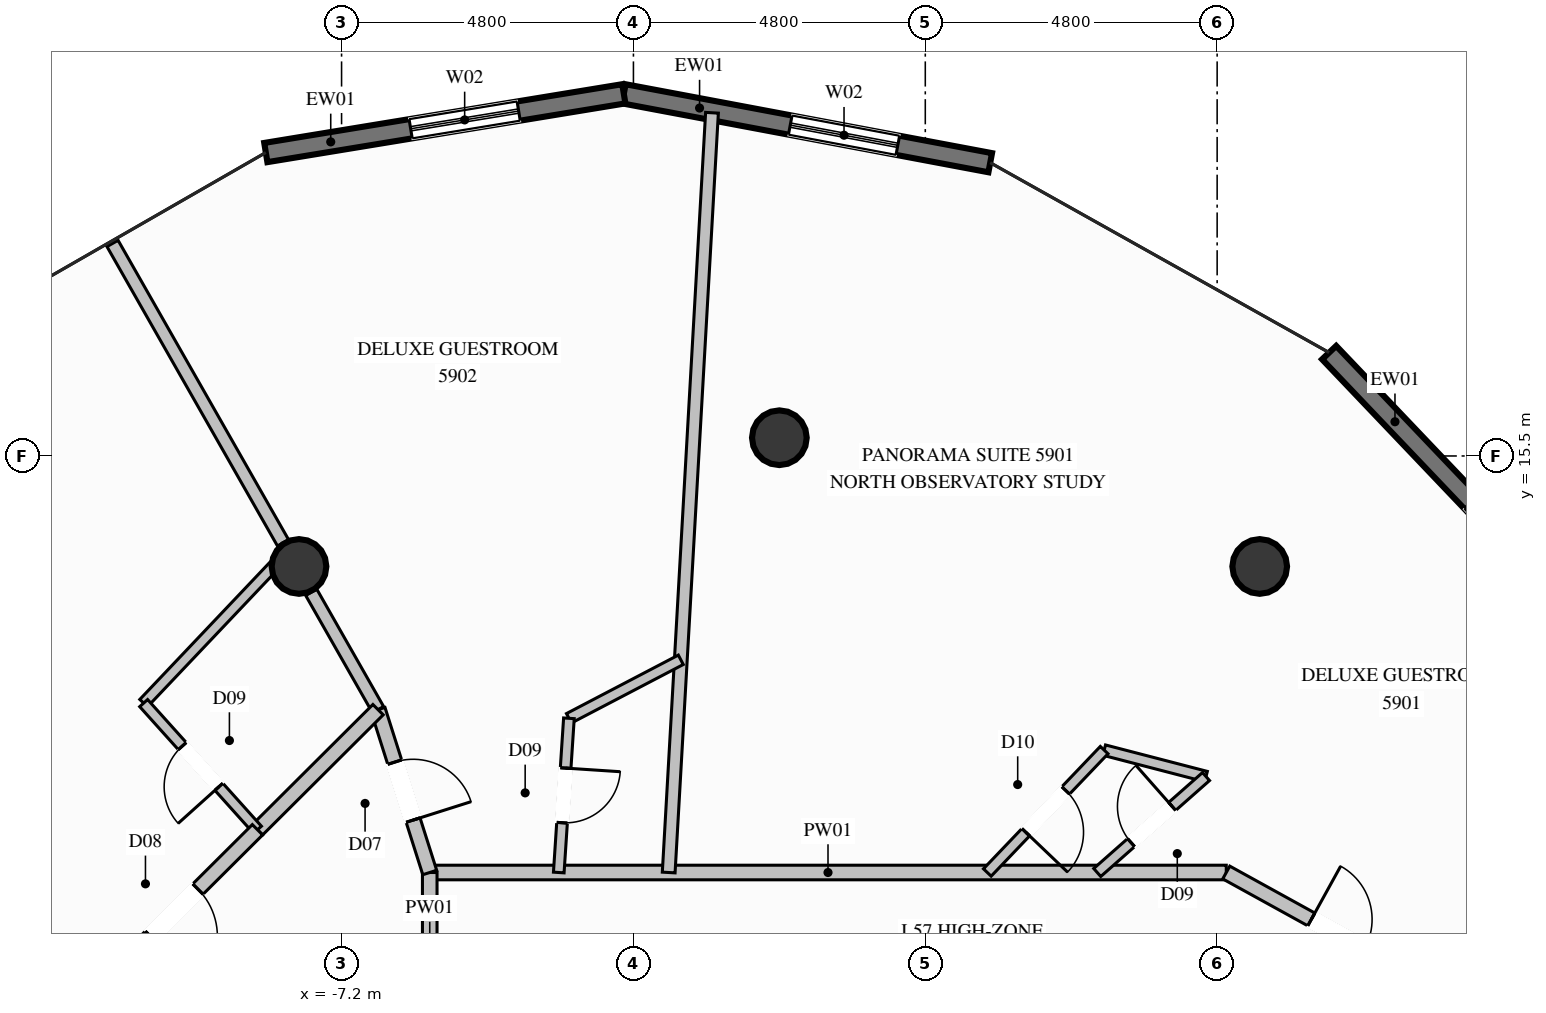
"""IFC4 building model, lengths in metres.
Left out: names, types, materials, properties, quantities, classifications, styles, units other than length and angle.
Written with IfcOpenShell. Run it as: python <this file> out.ifc"""

import sys

from ifc_helpers import new_model, si_unit, direction, frame, frame_2d, origin, origin_2d, place, context, subcontext, project, spatial, rectangle, circle, extrude, element, fill, save


model = new_model("IFC4")
c1 = context("Model", 3, precision=1e-05, world=origin(), true_north=direction((0.0, 1.0)))
c2 = subcontext(c1, "Body", "Model", "MODEL_VIEW")
j1 = project(units=[si_unit("LENGTHUNIT", "METRE"), si_unit("PLANEANGLEUNIT", "RADIAN")], contexts=[c1])
p1 = place(None, origin())
s1 = spatial("IfcSite", under=j1, at=p1, CompositionType="ELEMENT")
p2 = place(p1, origin())
s2 = spatial("IfcBuilding", under=s1, at=p2, CompositionType="ELEMENT")
p3 = place(p2, frame((0.0, 0.0, 220.0)))
s3 = spatial("IfcBuildingStorey", under=s2, at=p3, CompositionType="ELEMENT", Elevation=220.0)
for number, where, z_axis, x_axis in (
    (1, (7.9, 13.683, 0.0), (0.0, 0.0, 1.0), (1.0, 0.0, 0.0)),
    (2, (0.0, 15.8, 0.0), (0.0, 0.0, 1.0), (1.0, 0.0, 0.0)),
    (3, (-7.9, 13.683, 0.0), (0.0, 0.0, 1.0), (1.0, 0.0, 0.0)),
):
    element("IfcColumn", number, at=place(p3, frame(where, z_axis=z_axis, x_axis=x_axis)), inside=s3, PredefinedType="COLUMN", context=c2, shape_type="SweptSolid", body=[
        extrude(circle(Radius=0.45, at=origin_2d()), origin(), (0.0, 0.0, 1.0), 3.6),
    ])
p4 = place(p3, frame((9.042, 17.2, 0.0), z_axis=(0.0, 0.0, 1.0), x_axis=(0.689492567569, -0.724292757983, 0.0)))
e4 = element("IfcWall", 4, at=p4, inside=s3, PredefinedType="SOLIDWALL", context=c2, shape_type="SweptSolid", body=[
    extrude(rectangle(XDim=6.637, YDim=0.32, at=frame_2d((3.318, 0.0))), origin(), (0.0, 0.0, 1.0), 3.36),
])
p5 = place(p4, frame((3.39, 0.0, 0.35)))
e5 = element("IfcOpeningElement", 5, at=p5, cuts=e4, PredefinedType="OPENING", context=c2, shape_type="SweptSolid", body=[
    extrude(rectangle(XDim=1.8, YDim=2.6, at=frame_2d((0.9, 1.3))), frame((0.0, 0.17, 0.0), z_axis=(0.0, -1.0, 0.0), x_axis=(1.0, 0.0, 0.0)), (0.0, 0.0, 1.0), 0.34),
])
p6 = place(p3, frame((-2.558, 21.456, 0.0), z_axis=(0.0, 0.0, 1.0), x_axis=(0.982778756256, -0.184786136523, 0.0)))
e6 = element("IfcWall", 6, at=p6, inside=s3, PredefinedType="SOLIDWALL", context=c2, shape_type="SweptSolid", body=[
    extrude(rectangle(XDim=6.132, YDim=0.32, at=frame_2d((3.066, 0.0))), origin(), (0.0, 0.0, 1.0), 3.36),
])
p7 = place(p6, frame((2.785, 0.0, 0.35)))
e7 = element("IfcOpeningElement", 7, at=p7, cuts=e6, PredefinedType="OPENING", context=c2, shape_type="SweptSolid", body=[
    extrude(rectangle(XDim=1.8, YDim=2.6, at=frame_2d((0.9, 1.3))), frame((0.0, 0.17, 0.0), z_axis=(0.0, -1.0, 0.0), x_axis=(1.0, 0.0, 0.0)), (0.0, 0.0, 1.0), 0.34),
])
p8 = place(p3, frame((-8.446, 20.49, 0.0), z_axis=(0.0, 0.0, 1.0), x_axis=(0.986805489114, 0.161910242585, 0.0)))
e8 = element("IfcWall", 8, at=p8, inside=s3, PredefinedType="SOLIDWALL", context=c2, shape_type="SweptSolid", body=[
    extrude(rectangle(XDim=5.967, YDim=0.32, at=frame_2d((2.983, 0.0))), origin(), (0.0, 0.0, 1.0), 3.36),
])
p9 = place(p8, frame((2.414, 0.0, 0.35)))
e9 = element("IfcOpeningElement", 9, at=p9, cuts=e8, PredefinedType="OPENING", context=c2, shape_type="SweptSolid", body=[
    extrude(rectangle(XDim=1.8, YDim=2.6, at=frame_2d((0.9, 1.3))), frame((0.0, 0.17, 0.0), z_axis=(0.0, -1.0, 0.0), x_axis=(1.0, 0.0, 0.0)), (0.0, 0.0, 1.0), 0.34),
])
p10 = place(p3, frame((-5.75, 8.65, 0.0), z_axis=(0.0, 0.0, 1.0), x_axis=(1.0, 0.0, 0.0)))
e10 = element("IfcWall", 10, at=p10, inside=s3, PredefinedType="PARTITIONING", context=c2, shape_type="SweptSolid", body=[
    extrude(rectangle(XDim=13.1, YDim=0.24, at=frame_2d((6.55, 0.0))), origin(), (0.0, 0.0, 1.0), 3.36),
])
p11 = place(p3, frame((-5.75, 6.1, 0.0), z_axis=(0.0, 0.0, 1.0), x_axis=(0.0, 1.0, 0.0)))
e11 = element("IfcWall", 11, at=p11, inside=s3, PredefinedType="PARTITIONING", context=c2, shape_type="SweptSolid", body=[
    extrude(rectangle(XDim=2.55, YDim=0.24, at=frame_2d((1.275, 0.0))), origin(), (0.0, 0.0, 1.0), 3.36),
])
p12 = place(p3, frame((11.022, 6.625, 0.0), z_axis=(0.0, 0.0, 1.0), x_axis=(0.88806021567, 0.459727150975, 0.0)))
e12 = element("IfcWall", 12, at=p12, inside=s3, PredefinedType="PARTITIONING", context=c2, shape_type="SweptSolid", body=[
    extrude(rectangle(XDim=2.489, YDim=0.21, at=frame_2d((1.244, 0.0))), origin(), (0.0, 0.0, 1.0), 2.877),
])
p13 = place(p3, frame((-6.6, 11.328, 0.0), z_axis=(0.0, 0.0, 1.0), x_axis=(-0.494753305644, 0.869033466878, 0.0)))
e13 = element("IfcWall", 13, at=p13, inside=s3, PredefinedType="PARTITIONING", context=c2, shape_type="SweptSolid", body=[
    extrude(rectangle(XDim=2.221, YDim=0.21, at=frame_2d((1.11, 0.0))), origin(), (0.0, 0.0, 1.0), 2.877),
])
p14 = place(p3, frame((-8.163, 14.072, 0.0), z_axis=(0.0, 0.0, 1.0), x_axis=(-0.494908668638, 0.868944998091, 0.0)))
e14 = element("IfcWall", 14, at=p14, inside=s3, PredefinedType="PARTITIONING", context=c2, shape_type="SweptSolid", body=[
    extrude(rectangle(XDim=5.666, YDim=0.21, at=frame_2d((2.833, 0.0))), origin(), (0.0, 0.0, 1.0), 3.36),
])
p15 = place(p3, frame((5.342, 10.663, 0.0), z_axis=(0.0, 0.0, 1.0), x_axis=(0.967886377615, -0.251388066595, 0.0)))
e15 = element("IfcWall", 15, at=p15, inside=s3, PredefinedType="PLUMBINGWALL", context=c2, shape_type="SweptSolid", body=[
    extrude(rectangle(XDim=1.731, YDim=0.175, at=frame_2d((0.865, 0.0))), origin(), (0.0, 0.0, 1.0), 3.36),
])
p16 = place(p3, frame((5.342, 10.663, 0.0), z_axis=(0.0, 0.0, 1.0), x_axis=(-0.690559187333, -0.723275887051, 0.0)))
e16 = element("IfcWall", 16, at=p16, inside=s3, PredefinedType="PLUMBINGWALL", context=c2, shape_type="SweptSolid", body=[
    extrude(rectangle(XDim=2.783, YDim=0.175, at=frame_2d((1.392, 0.0))), origin(), (0.0, 0.0, 1.0), 3.36),
])
p17 = place(p16, frame((0.917, 0.0, 0.0)))
e17 = element("IfcOpeningElement", 17, at=p17, cuts=e16, PredefinedType="OPENING", context=c2, shape_type="SweptSolid", body=[
    extrude(rectangle(XDim=0.95, YDim=2.1, at=frame_2d((0.475, 1.05))), frame((0.0, 0.098, 0.0), z_axis=(0.0, -1.0, 0.0), x_axis=(1.0, 0.0, 0.0)), (0.0, 0.0, 1.0), 0.195),
])
p18 = place(p3, frame((5.228, 8.65, 0.0), z_axis=(0.0, 0.0, 1.0), x_axis=(0.749933416173, 0.66151331907, 0.0)))
e18 = element("IfcWall", 18, at=p18, inside=s3, PredefinedType="PLUMBINGWALL", context=c2, shape_type="SweptSolid", body=[
    extrude(rectangle(XDim=2.386, YDim=0.175, at=frame_2d((1.193, 0.0))), origin(), (0.0, 0.0, 1.0), 3.36),
])
p19 = place(p18, frame((0.743, 0.0, 0.0)))
e19 = element("IfcOpeningElement", 19, at=p19, cuts=e18, PredefinedType="OPENING", context=c2, shape_type="SweptSolid", body=[
    extrude(rectangle(XDim=0.9, YDim=2.1, at=frame_2d((0.45, 1.05))), frame((0.0, 0.098, 0.0), z_axis=(0.0, -1.0, 0.0), x_axis=(1.0, 0.0, 0.0)), (0.0, 0.0, 1.0), 0.195),
])
p20 = place(p3, frame((7.35, 8.65, 0.0), z_axis=(0.0, 0.0, 1.0), x_axis=(0.875674474849, -0.482901867979, 0.0)))
e20 = element("IfcWall", 20, at=p20, inside=s3, PredefinedType="PARTITIONING", context=c2, shape_type="SweptSolid", body=[
    extrude(rectangle(XDim=4.193, YDim=0.24, at=frame_2d((2.097, 0.0))), origin(), (0.0, 0.0, 1.0), 3.36),
])
p21 = place(p20, frame((1.597, 0.0, 0.0)))
e21 = element("IfcOpeningElement", 21, at=p21, cuts=e20, PredefinedType="OPENING", context=c2, shape_type="SweptSolid", body=[
    extrude(rectangle(XDim=1.0, YDim=2.2, at=frame_2d((0.5, 1.1))), frame((0.0, 0.13, 0.0), z_axis=(0.0, -1.0, 0.0), x_axis=(1.0, 0.0, 0.0)), (0.0, 0.0, 1.0), 0.26),
])
p22 = place(p3, frame((-1.82, 8.65, 0.0), z_axis=(0.0, 0.0, 1.0), x_axis=(0.056907006267, 0.998379483282, 0.0)))
e22 = element("IfcWall", 22, at=p22, inside=s3, PredefinedType="PARTITIONING", context=c2, shape_type="SweptSolid", body=[
    extrude(rectangle(XDim=12.514, YDim=0.21, at=frame_2d((6.257, 0.0))), origin(), (0.0, 0.0, 1.0), 3.36),
])
p23 = place(p3, frame((-3.461, 11.186, 0.0), z_axis=(0.0, 0.0, 1.0), x_axis=(0.886190330108, 0.463321377472, 0.0)))
e23 = element("IfcWall", 23, at=p23, inside=s3, PredefinedType="PLUMBINGWALL", context=c2, shape_type="SweptSolid", body=[
    extrude(rectangle(XDim=2.076, YDim=0.175, at=frame_2d((1.038, 0.0))), origin(), (0.0, 0.0, 1.0), 3.36),
])
p24 = place(p3, frame((-3.461, 11.186, 0.0), z_axis=(0.0, 0.0, 1.0), x_axis=(-0.065702929533, -0.997839228058, 0.0)))
e24 = element("IfcWall", 24, at=p24, inside=s3, PredefinedType="PLUMBINGWALL", context=c2, shape_type="SweptSolid", body=[
    extrude(rectangle(XDim=2.542, YDim=0.175, at=frame_2d((1.271, 0.0))), origin(), (0.0, 0.0, 1.0), 3.36),
])
p25 = place(p24, frame((0.821, 0.0, 0.0)))
e25 = element("IfcOpeningElement", 25, at=p25, cuts=e24, PredefinedType="OPENING", context=c2, shape_type="SweptSolid", body=[
    extrude(rectangle(XDim=0.9, YDim=2.1, at=frame_2d((0.45, 1.05))), frame((0.0, 0.098, 0.0), z_axis=(0.0, -1.0, 0.0), x_axis=(1.0, 0.0, 0.0)), (0.0, 0.0, 1.0), 0.195),
])
p26 = place(p3, frame((-6.6, 11.328, 0.0), z_axis=(0.0, 0.0, 1.0), x_axis=(0.30256159068, -0.953129835775, 0.0)))
e26 = element("IfcWall", 26, at=p26, inside=s3, PredefinedType="PARTITIONING", context=c2, shape_type="SweptSolid", body=[
    extrude(rectangle(XDim=2.81, YDim=0.24, at=frame_2d((1.405, 0.0))), origin(), (0.0, 0.0, 1.0), 3.36),
])
p27 = place(p26, frame((0.905, 0.0, 0.0)))
e27 = element("IfcOpeningElement", 27, at=p27, cuts=e26, PredefinedType="OPENING", context=c2, shape_type="SweptSolid", body=[
    extrude(rectangle(XDim=1.0, YDim=2.2, at=frame_2d((0.5, 1.1))), frame((0.0, 0.13, 0.0), z_axis=(0.0, -1.0, 0.0), x_axis=(1.0, 0.0, 0.0)), (0.0, 0.0, 1.0), 0.26),
])
p28 = place(p3, frame((-6.6, 11.328, 0.0), z_axis=(0.0, 0.0, 1.0), x_axis=(-0.708544738437, -0.705665893772, 0.0)))
e28 = element("IfcWall", 28, at=p28, inside=s3, PredefinedType="PARTITIONING", context=c2, shape_type="SweptSolid", body=[
    extrude(rectangle(XDim=2.799, YDim=0.24, at=frame_2d((1.399, 0.0))), origin(), (0.0, 0.0, 1.0), 3.36),
])
p29 = place(p3, frame((-8.085, 13.935, 0.0), z_axis=(0.0, 0.0, 1.0), x_axis=(-0.688145634745, -0.725572591394, 0.0)))
e29 = element("IfcWall", 29, at=p29, inside=s3, PredefinedType="PLUMBINGWALL", context=c2, shape_type="SweptSolid", body=[
    extrude(rectangle(XDim=3.444, YDim=0.175, at=frame_2d((1.722, 0.0))), origin(), (0.0, 0.0, 1.0), 2.929),
])
p30 = place(p3, frame((-8.583, 9.353, 0.0), z_axis=(0.0, 0.0, 1.0), x_axis=(-0.668444418094, 0.743762099006, 0.0)))
e30 = element("IfcWall", 30, at=p30, inside=s3, PredefinedType="PLUMBINGWALL", context=c2, shape_type="SweptSolid", body=[
    extrude(rectangle(XDim=2.801, YDim=0.175, at=frame_2d((1.4, 0.0))), origin(), (0.0, 0.0, 1.0), 3.36),
])
p31 = place(p30, frame((0.95, 0.0, 0.0)))
e31 = element("IfcOpeningElement", 31, at=p31, cuts=e30, PredefinedType="OPENING", context=c2, shape_type="SweptSolid", body=[
    extrude(rectangle(XDim=0.9, YDim=2.1, at=frame_2d((0.45, 1.05))), frame((0.0, 0.098, 0.0), z_axis=(0.0, -1.0, 0.0), x_axis=(1.0, 0.0, 0.0)), (0.0, 0.0, 1.0), 0.195),
])
p32 = place(p3, frame((-8.583, 9.353, 0.0), z_axis=(0.0, 0.0, 1.0), x_axis=(-0.70852632163, -0.70568438523, 0.0)))
e32 = element("IfcWall", 32, at=p32, inside=s3, PredefinedType="PARTITIONING", context=c2, shape_type="SweptSolid", body=[
    extrude(rectangle(XDim=3.866, YDim=0.24, at=frame_2d((1.933, 0.0))), origin(), (0.0, 0.0, 1.0), 3.36),
])
p33 = place(p32, frame((1.383, 0.0, 0.0)))
e33 = element("IfcOpeningElement", 33, at=p33, cuts=e32, PredefinedType="OPENING", context=c2, shape_type="SweptSolid", body=[
    extrude(rectangle(XDim=1.1, YDim=2.3, at=frame_2d((0.55, 1.15))), frame((0.0, 0.13, 0.0), z_axis=(0.0, -1.0, 0.0), x_axis=(1.0, 0.0, 0.0)), (0.0, 0.0, 1.0), 0.26),
])
p34 = place(p7, origin())
e34 = element("IfcWindow", 34, at=p34, inside=s3, PartitioningType="SINGLE_PANEL", PredefinedType="WINDOW", context=c2, shape_type="SweptSolid", body=[
    extrude(rectangle(XDim=1.8, YDim=2.6, at=frame_2d((0.9, 1.3))), frame((0.0, 0.03, 0.0), z_axis=(0.0, -1.0, 0.0), x_axis=(1.0, 0.0, 0.0)), (0.0, 0.0, 1.0), 0.06),
])
fill(e7, e34)
p35 = place(p9, origin())
e35 = element("IfcWindow", 35, at=p35, inside=s3, PartitioningType="SINGLE_PANEL", PredefinedType="WINDOW", context=c2, shape_type="SweptSolid", body=[
    extrude(rectangle(XDim=1.8, YDim=2.6, at=frame_2d((0.9, 1.3))), frame((0.0, 0.03, 0.0), z_axis=(0.0, -1.0, 0.0), x_axis=(1.0, 0.0, 0.0)), (0.0, 0.0, 1.0), 0.06),
])
fill(e9, e35)
p36 = place(p19, origin())
e36 = element("IfcDoor", 36, at=p36, inside=s3, OperationType="SINGLE_SWING_RIGHT", PredefinedType="DOOR", context=c2, shape_type="SweptSolid", body=[
    extrude(rectangle(XDim=0.9, YDim=2.1, at=frame_2d((0.45, 1.05))), frame((0.0, 0.025, 0.0), z_axis=(0.0, -1.0, 0.0), x_axis=(1.0, 0.0, 0.0)), (0.0, 0.0, 1.0), 0.05),
])
fill(e19, e36)
p37 = place(p21, origin())
e37 = element("IfcDoor", 37, at=p37, inside=s3, OperationType="SINGLE_SWING_LEFT", PredefinedType="DOOR", context=c2, shape_type="SweptSolid", body=[
    extrude(rectangle(XDim=1.0, YDim=2.2, at=frame_2d((0.5, 1.1))), frame((0.0, 0.025, 0.0), z_axis=(0.0, -1.0, 0.0), x_axis=(1.0, 0.0, 0.0)), (0.0, 0.0, 1.0), 0.05),
])
fill(e21, e37)
p38 = place(p17, origin())
e38 = element("IfcDoor", 38, at=p38, inside=s3, OperationType="SINGLE_SWING_RIGHT", PredefinedType="DOOR", context=c2, shape_type="SweptSolid", body=[
    extrude(rectangle(XDim=0.95, YDim=2.1, at=frame_2d((0.475, 1.05))), frame((0.0, 0.025, 0.0), z_axis=(0.0, -1.0, 0.0), x_axis=(1.0, 0.0, 0.0)), (0.0, 0.0, 1.0), 0.05),
])
fill(e17, e38)
p39 = place(p25, origin())
e39 = element("IfcDoor", 39, at=p39, inside=s3, OperationType="SINGLE_SWING_LEFT", PredefinedType="DOOR", context=c2, shape_type="SweptSolid", body=[
    extrude(rectangle(XDim=0.9, YDim=2.1, at=frame_2d((0.45, 1.05))), frame((0.0, 0.025, 0.0), z_axis=(0.0, -1.0, 0.0), x_axis=(1.0, 0.0, 0.0)), (0.0, 0.0, 1.0), 0.05),
])
fill(e25, e39)
p40 = place(p27, origin())
e40 = element("IfcDoor", 40, at=p40, inside=s3, OperationType="SINGLE_SWING_RIGHT", PredefinedType="DOOR", context=c2, shape_type="SweptSolid", body=[
    extrude(rectangle(XDim=1.0, YDim=2.2, at=frame_2d((0.5, 1.1))), frame((0.0, 0.025, 0.0), z_axis=(0.0, -1.0, 0.0), x_axis=(1.0, 0.0, 0.0)), (0.0, 0.0, 1.0), 0.05),
])
fill(e27, e40)
p41 = place(p31, origin())
e41 = element("IfcDoor", 41, at=p41, inside=s3, OperationType="SINGLE_SWING_LEFT", PredefinedType="DOOR", context=c2, shape_type="SweptSolid", body=[
    extrude(rectangle(XDim=0.9, YDim=2.1, at=frame_2d((0.45, 1.05))), frame((0.0, 0.025, 0.0), z_axis=(0.0, -1.0, 0.0), x_axis=(1.0, 0.0, 0.0)), (0.0, 0.0, 1.0), 0.05),
])
fill(e31, e41)
p42 = place(p33, origin())
e42 = element("IfcDoor", 42, at=p42, inside=s3, OperationType="SINGLE_SWING_RIGHT", PredefinedType="DOOR", context=c2, shape_type="SweptSolid", body=[
    extrude(rectangle(XDim=1.1, YDim=2.3, at=frame_2d((0.55, 1.15))), frame((0.0, 0.025, 0.0), z_axis=(0.0, -1.0, 0.0), x_axis=(1.0, 0.0, 0.0)), (0.0, 0.0, 1.0), 0.05),
])
fill(e33, e42)
save(model, sys.argv[1])
